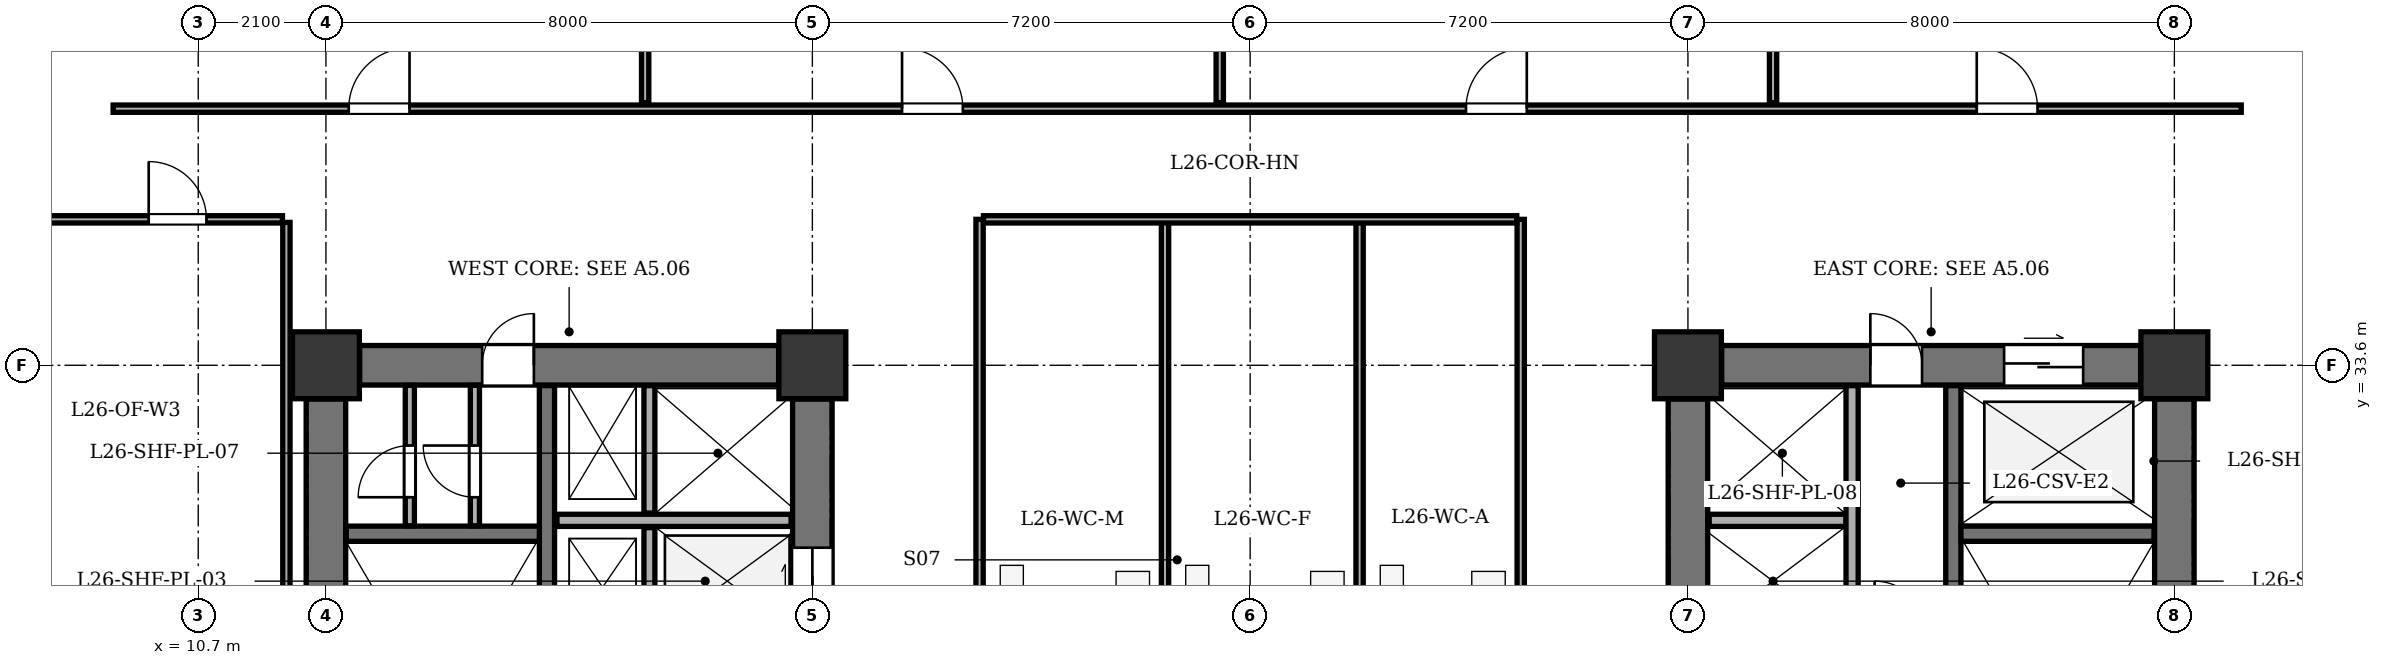
"""IFC4 building model, lengths in metres.
Left out: names, types, materials, properties, quantities, classifications, styles, units other than length and angle.
Written with IfcOpenShell. Run it as: python <this file> out.ifc"""

import sys

from ifc_helpers import new_model, si_unit, direction, frame, frame_2d, origin, origin_2d, place, context, subcontext, project, spatial, rectangle, extrude, element, fill, save


model = new_model("IFC4")
c1 = context("Model", 3, precision=1e-05, world=origin(), true_north=direction((0.0, 1.0)))
c2 = subcontext(c1, "Body", "Model", "MODEL_VIEW")
j1 = project(units=[si_unit("LENGTHUNIT", "METRE"), si_unit("PLANEANGLEUNIT", "RADIAN")], contexts=[c1])
p1 = place(None, origin())
s1 = spatial("IfcSite", under=j1, at=p1, CompositionType="ELEMENT")
p2 = place(p1, origin())
s2 = spatial("IfcBuilding", under=s1, at=p2, CompositionType="ELEMENT")
p3 = place(p2, frame((0.0, 0.0, 106.2)))
s3 = spatial("IfcBuildingStorey", under=s2, at=p3, CompositionType="ELEMENT", Elevation=106.2)
for number, where, z_axis, x_axis in (
    (1, (12.8, 33.6, 0.0), (0.0, 0.0, 1.0), (1.0, 0.0, 0.0)),
    (2, (20.8, 33.6, 0.0), (0.0, 0.0, 1.0), (1.0, 0.0, 0.0)),
    (3, (35.2, 33.6, 0.0), (0.0, 0.0, 1.0), (1.0, 0.0, 0.0)),
    (4, (43.2, 33.6, 0.0), (0.0, 0.0, 1.0), (1.0, 0.0, 0.0)),
):
    element("IfcColumn", number, at=place(p3, frame(where, z_axis=z_axis, x_axis=x_axis)), inside=s3, PredefinedType="COLUMN", context=c2, shape_type="SweptSolid", body=[
        extrude(rectangle(XDim=1.1, YDim=1.1, at=origin_2d()), origin(), (0.0, 0.0, 1.0), 3.9),
    ])
p4 = place(p3, frame((12.8, 21.355, 0.0), z_axis=(0.0, 0.0, 1.0), x_axis=(0.0, 1.0, 0.0)))
e5 = element("IfcWall", 5, at=p4, inside=s3, PredefinedType="SHEAR", context=c2, shape_type="SweptSolid", body=[
    extrude(rectangle(XDim=11.69, YDim=0.65, at=frame_2d((5.845, 0.0))), origin(), (0.0, 0.0, 1.0), 3.45),
])
p5 = place(p3, frame((13.355, 33.6, 0.0), z_axis=(0.0, 0.0, 1.0), x_axis=(1.0, 0.0, 0.0)))
e6 = element("IfcWall", 6, at=p5, inside=s3, PredefinedType="SHEAR", context=c2, shape_type="SweptSolid", body=[
    extrude(rectangle(XDim=6.89, YDim=0.65, at=frame_2d((3.445, 0.0))), origin(), (0.0, 0.0, 1.0), 3.45),
])
p6 = place(p5, frame((2.015, 0.0, 0.0)))
e7 = element("IfcOpeningElement", 7, at=p6, cuts=e6, PredefinedType="OPENING", context=c2, shape_type="SweptSolid", body=[
    extrude(rectangle(XDim=0.85, YDim=2.02, at=frame_2d((0.425, 1.01))), frame((0.0, 0.335, 0.0), z_axis=(0.0, -1.0, 0.0), x_axis=(1.0, 0.0, 0.0)), (0.0, 0.0, 1.0), 0.67),
])
p7 = place(p3, frame((20.8, 21.355, 0.0), z_axis=(0.0, 0.0, 1.0), x_axis=(0.0, 1.0, 0.0)))
e8 = element("IfcWall", 8, at=p7, inside=s3, PredefinedType="SHEAR", context=c2, shape_type="SweptSolid", body=[
    extrude(rectangle(XDim=11.69, YDim=0.65, at=frame_2d((5.845, 0.0))), origin(), (0.0, 0.0, 1.0), 3.45),
])
p8 = place(p7, frame((1.245, 0.0, 0.0)))
e9 = element("IfcOpeningElement", 9, at=p8, cuts=e8, PredefinedType="OPENING", context=c2, shape_type="SweptSolid", body=[
    extrude(rectangle(XDim=1.2, YDim=2.15, at=frame_2d((0.6, 1.075))), frame((0.0, 0.335, 0.0), z_axis=(0.0, -1.0, 0.0), x_axis=(1.0, 0.0, 0.0)), (0.0, 0.0, 1.0), 0.67),
])
p9 = place(p7, frame((4.245, 0.0, 0.0)))
e10 = element("IfcOpeningElement", 10, at=p9, cuts=e8, PredefinedType="OPENING", context=c2, shape_type="SweptSolid", body=[
    extrude(rectangle(XDim=1.1, YDim=2.1, at=frame_2d((0.55, 1.05))), frame((0.0, 0.335, 0.0), z_axis=(0.0, -1.0, 0.0), x_axis=(1.0, 0.0, 0.0)), (0.0, 0.0, 1.0), 0.67),
])
p10 = place(p7, frame((6.195, 0.0, 0.0)))
e11 = element("IfcOpeningElement", 11, at=p10, cuts=e8, PredefinedType="OPENING", context=c2, shape_type="SweptSolid", body=[
    extrude(rectangle(XDim=1.1, YDim=2.1, at=frame_2d((0.55, 1.05))), frame((0.0, 0.335, 0.0), z_axis=(0.0, -1.0, 0.0), x_axis=(1.0, 0.0, 0.0)), (0.0, 0.0, 1.0), 0.67),
])
p11 = place(p7, frame((8.145, 0.0, 0.0)))
e12 = element("IfcOpeningElement", 12, at=p11, cuts=e8, PredefinedType="OPENING", context=c2, shape_type="SweptSolid", body=[
    extrude(rectangle(XDim=1.1, YDim=2.1, at=frame_2d((0.55, 1.05))), frame((0.0, 0.335, 0.0), z_axis=(0.0, -1.0, 0.0), x_axis=(1.0, 0.0, 0.0)), (0.0, 0.0, 1.0), 0.67),
])
p12 = place(p3, frame((16.435, 21.135, 0.0), z_axis=(0.0, 0.0, 1.0), x_axis=(0.0, 1.0, 0.0)))
e13 = element("IfcWall", 13, at=p12, inside=s3, PredefinedType="SHEAR", context=c2, shape_type="SweptSolid", body=[
    extrude(rectangle(XDim=12.13, YDim=0.25, at=frame_2d((6.065, 0.0))), origin(), (0.0, 0.0, 1.0), 3.45),
])
p13 = place(p12, frame((0.515, 0.0, 0.0)))
e14 = element("IfcOpeningElement", 14, at=p13, cuts=e13, PredefinedType="OPENING", context=c2, shape_type="SweptSolid", body=[
    extrude(rectangle(XDim=1.2, YDim=2.15, at=frame_2d((0.6, 1.075))), frame((0.0, 0.135, 0.0), z_axis=(0.0, -1.0, 0.0), x_axis=(1.0, 0.0, 0.0)), (0.0, 0.0, 1.0), 0.27),
])
p14 = place(p12, frame((2.665, 0.0, 0.0)))
e15 = element("IfcOpeningElement", 15, at=p14, cuts=e13, PredefinedType="OPENING", context=c2, shape_type="SweptSolid", body=[
    extrude(rectangle(XDim=1.15, YDim=2.15, at=frame_2d((0.575, 1.075))), frame((0.0, 0.135, 0.0), z_axis=(0.0, -1.0, 0.0), x_axis=(1.0, 0.0, 0.0)), (0.0, 0.0, 1.0), 0.27),
])
p15 = place(p3, frame((13.135, 30.83, 0.0), z_axis=(0.0, 0.0, 1.0), x_axis=(1.0, 0.0, 0.0)))
e16 = element("IfcWall", 16, at=p15, inside=s3, PredefinedType="SHEAR", context=c2, shape_type="SweptSolid", body=[
    extrude(rectangle(XDim=3.175, YDim=0.25, at=frame_2d((1.587, 0.0))), origin(), (0.0, 0.0, 1.0), 3.45),
])
p16 = place(p3, frame((16.6, 31.05, 0.0), z_axis=(0.0, 0.0, 1.0), x_axis=(1.0, 0.0, 0.0)))
e17 = element("IfcWall", 17, at=p16, inside=s3, PredefinedType="SOLIDWALL", context=c2, shape_type="SweptSolid", body=[
    extrude(rectangle(XDim=3.85, YDim=0.2, at=frame_2d((1.925, 0.0))), origin(), (0.0, 0.0, 1.0), 3.45),
])
p17 = place(p3, frame((18.12, 25.27, 0.0), z_axis=(0.0, 0.0, 1.0), x_axis=(0.0, 1.0, 0.0)))
e18 = element("IfcWall", 18, at=p17, inside=s3, PredefinedType="PARTITIONING", context=c2, shape_type="SweptSolid", body=[
    extrude(rectangle(XDim=5.66, YDim=0.18, at=frame_2d((2.83, 0.0))), origin(), (0.0, 0.0, 1.0), 3.45),
])
p18 = place(p3, frame((18.12, 31.17, 0.0), z_axis=(0.0, 0.0, 1.0), x_axis=(0.0, 1.0, 0.0)))
e19 = element("IfcWall", 19, at=p18, inside=s3, PredefinedType="PARTITIONING", context=c2, shape_type="SweptSolid", body=[
    extrude(rectangle(XDim=2.095, YDim=0.18, at=frame_2d((1.047, 0.0))), origin(), (0.0, 0.0, 1.0), 3.45),
])
p19 = place(p3, frame((43.2, 21.355, 0.0), z_axis=(0.0, 0.0, 1.0), x_axis=(0.0, 1.0, 0.0)))
e20 = element("IfcWall", 20, at=p19, inside=s3, PredefinedType="SHEAR", context=c2, shape_type="SweptSolid", body=[
    extrude(rectangle(XDim=11.69, YDim=0.65, at=frame_2d((5.845, 0.0))), origin(), (0.0, 0.0, 1.0), 3.45),
])
p20 = place(p3, frame((35.755, 33.6, 0.0), z_axis=(0.0, 0.0, 1.0), x_axis=(1.0, 0.0, 0.0)))
e21 = element("IfcWall", 21, at=p20, inside=s3, PredefinedType="SHEAR", context=c2, shape_type="SweptSolid", body=[
    extrude(rectangle(XDim=6.89, YDim=0.65, at=frame_2d((3.445, 0.0))), origin(), (0.0, 0.0, 1.0), 3.45),
])
p21 = place(p20, frame((4.645, 0.0, 0.0)))
e22 = element("IfcOpeningElement", 22, at=p21, cuts=e21, PredefinedType="OPENING", context=c2, shape_type="SweptSolid", body=[
    extrude(rectangle(XDim=1.3, YDim=2.15, at=frame_2d((0.65, 1.075))), frame((0.0, 0.335, 0.0), z_axis=(0.0, -1.0, 0.0), x_axis=(1.0, 0.0, 0.0)), (0.0, 0.0, 1.0), 0.67),
])
p22 = place(p20, frame((2.445, 0.0, 0.0)))
e23 = element("IfcOpeningElement", 23, at=p22, cuts=e21, PredefinedType="OPENING", context=c2, shape_type="SweptSolid", body=[
    extrude(rectangle(XDim=0.85, YDim=2.02, at=frame_2d((0.425, 1.01))), frame((0.0, 0.335, 0.0), z_axis=(0.0, -1.0, 0.0), x_axis=(1.0, 0.0, 0.0)), (0.0, 0.0, 1.0), 0.67),
])
p23 = place(p3, frame((35.2, 21.355, 0.0), z_axis=(0.0, 0.0, 1.0), x_axis=(0.0, 1.0, 0.0)))
e24 = element("IfcWall", 24, at=p23, inside=s3, PredefinedType="SHEAR", context=c2, shape_type="SweptSolid", body=[
    extrude(rectangle(XDim=11.69, YDim=0.65, at=frame_2d((5.845, 0.0))), origin(), (0.0, 0.0, 1.0), 3.45),
])
p24 = place(p23, frame((1.245, 0.0, 0.0)))
e25 = element("IfcOpeningElement", 25, at=p24, cuts=e24, PredefinedType="OPENING", context=c2, shape_type="SweptSolid", body=[
    extrude(rectangle(XDim=1.2, YDim=2.15, at=frame_2d((0.6, 1.075))), frame((0.0, 0.335, 0.0), z_axis=(0.0, -1.0, 0.0), x_axis=(1.0, 0.0, 0.0)), (0.0, 0.0, 1.0), 0.67),
])
p25 = place(p3, frame((39.565, 21.135, 0.0), z_axis=(0.0, 0.0, 1.0), x_axis=(0.0, 1.0, 0.0)))
e26 = element("IfcWall", 26, at=p25, inside=s3, PredefinedType="SHEAR", context=c2, shape_type="SweptSolid", body=[
    extrude(rectangle(XDim=12.13, YDim=0.25, at=frame_2d((6.065, 0.0))), origin(), (0.0, 0.0, 1.0), 3.45),
])
p26 = place(p25, frame((0.515, 0.0, 0.0)))
e27 = element("IfcOpeningElement", 27, at=p26, cuts=e26, PredefinedType="OPENING", context=c2, shape_type="SweptSolid", body=[
    extrude(rectangle(XDim=1.2, YDim=2.15, at=frame_2d((0.6, 1.075))), frame((0.0, 0.135, 0.0), z_axis=(0.0, -1.0, 0.0), x_axis=(1.0, 0.0, 0.0)), (0.0, 0.0, 1.0), 0.27),
])
p27 = place(p25, frame((2.665, 0.0, 0.0)))
e28 = element("IfcOpeningElement", 28, at=p27, cuts=e26, PredefinedType="OPENING", context=c2, shape_type="SweptSolid", body=[
    extrude(rectangle(XDim=1.15, YDim=2.15, at=frame_2d((0.575, 1.075))), frame((0.0, 0.135, 0.0), z_axis=(0.0, -1.0, 0.0), x_axis=(1.0, 0.0, 0.0)), (0.0, 0.0, 1.0), 0.27),
])
p28 = place(p3, frame((39.69, 30.83, 0.0), z_axis=(0.0, 0.0, 1.0), x_axis=(1.0, 0.0, 0.0)))
e29 = element("IfcWall", 29, at=p28, inside=s3, PredefinedType="SHEAR", context=c2, shape_type="SweptSolid", body=[
    extrude(rectangle(XDim=3.175, YDim=0.25, at=frame_2d((1.587, 0.0))), origin(), (0.0, 0.0, 1.0), 3.45),
])
p29 = place(p3, frame((35.55, 31.05, 0.0), z_axis=(0.0, 0.0, 1.0), x_axis=(1.0, 0.0, 0.0)))
e30 = element("IfcWall", 30, at=p29, inside=s3, PredefinedType="SOLIDWALL", context=c2, shape_type="SweptSolid", body=[
    extrude(rectangle(XDim=2.25, YDim=0.2, at=frame_2d((1.125, 0.0))), origin(), (0.0, 0.0, 1.0), 3.45),
])
p30 = place(p3, frame((37.9, 25.27, 0.0), z_axis=(0.0, 0.0, 1.0), x_axis=(0.0, 1.0, 0.0)))
e31 = element("IfcWall", 31, at=p30, inside=s3, PredefinedType="SOLIDWALL", context=c2, shape_type="SweptSolid", body=[
    extrude(rectangle(XDim=7.995, YDim=0.2, at=frame_2d((3.998, 0.0))), origin(), (0.0, 0.0, 1.0), 3.45),
])
p31 = place(p3, frame((14.18, 30.96, 0.0), z_axis=(0.0, 0.0, 1.0), x_axis=(0.0, 1.0, 0.0)))
e32 = element("IfcWall", 32, at=p31, inside=s3, PredefinedType="PARTITIONING", context=c2, shape_type="SweptSolid", body=[
    extrude(rectangle(XDim=2.31, YDim=0.15, at=frame_2d((1.155, 0.0))), origin(), (0.0, 0.0, 1.0), 3.45),
])
p32 = place(p31, frame((0.47, 0.0, 0.0)))
e33 = element("IfcOpeningElement", 33, at=p32, cuts=e32, PredefinedType="OPENING", context=c2, shape_type="SweptSolid", body=[
    extrude(rectangle(XDim=0.85, YDim=2.02, at=frame_2d((0.425, 1.01))), frame((0.0, 0.085, 0.0), z_axis=(0.0, -1.0, 0.0), x_axis=(1.0, 0.0, 0.0)), (0.0, 0.0, 1.0), 0.17),
])
p33 = place(p3, frame((15.25, 30.96, 0.0), z_axis=(0.0, 0.0, 1.0), x_axis=(0.0, 1.0, 0.0)))
e34 = element("IfcWall", 34, at=p33, inside=s3, PredefinedType="PARTITIONING", context=c2, shape_type="SweptSolid", body=[
    extrude(rectangle(XDim=2.31, YDim=0.15, at=frame_2d((1.155, 0.0))), origin(), (0.0, 0.0, 1.0), 3.45),
])
p34 = place(p33, frame((0.47, 0.0, 0.0)))
e35 = element("IfcOpeningElement", 35, at=p34, cuts=e34, PredefinedType="OPENING", context=c2, shape_type="SweptSolid", body=[
    extrude(rectangle(XDim=0.85, YDim=2.02, at=frame_2d((0.425, 1.01))), frame((0.0, 0.085, 0.0), z_axis=(0.0, -1.0, 0.0), x_axis=(1.0, 0.0, 0.0)), (0.0, 0.0, 1.0), 0.17),
])
for number, where, z_axis, x_axis in (
    (36, (23.55, 24.715, 0.0), (0.0, 0.0, 1.0), (0.0, 1.0, 0.0)),
    (37, (32.45, 24.715, 0.0), (0.0, 0.0, 1.0), (0.0, 1.0, 0.0)),
    (38, (26.6, 24.715, 0.0), (0.0, 0.0, 1.0), (0.0, 1.0, 0.0)),
):
    element("IfcWall", number, at=place(p3, frame(where, z_axis=z_axis, x_axis=x_axis)), inside=s3, PredefinedType="PARTITIONING", context=c2, shape_type="SweptSolid", body=[
        extrude(rectangle(XDim=11.285, YDim=0.12, at=frame_2d((5.643, 0.0))), origin(), (0.0, 0.0, 1.0), 3.45),
    ])
p35 = place(p3, frame((29.8, 24.715, 0.0), z_axis=(0.0, 0.0, 1.0), x_axis=(0.0, 1.0, 0.0)))
e39 = element("IfcWall", 39, at=p35, inside=s3, PredefinedType="PARTITIONING", context=c2, shape_type="SweptSolid", body=[
    extrude(rectangle(XDim=11.285, YDim=0.12, at=frame_2d((5.643, 0.0))), origin(), (0.0, 0.0, 1.0), 2.985),
])
p36 = place(p3, frame((23.615, 36.0, 0.0), z_axis=(0.0, 0.0, 1.0), x_axis=(1.0, 0.0, 0.0)))
e40 = element("IfcWall", 40, at=p36, inside=s3, PredefinedType="PARTITIONING", context=c2, shape_type="SweptSolid", body=[
    extrude(rectangle(XDim=8.77, YDim=0.12, at=frame_2d((4.385, 0.0))), origin(), (0.0, 0.0, 1.0), 3.45),
])
p37 = place(p3, frame((9.3, 37.82, 0.0), z_axis=(0.0, 0.0, 1.0), x_axis=(1.0, 0.0, 0.0)))
e41 = element("IfcWall", 41, at=p37, inside=s3, PredefinedType="PARTITIONING", context=c2, shape_type="SweptSolid", body=[
    extrude(rectangle(XDim=35.0, YDim=0.12, at=frame_2d((17.5, 0.0))), origin(), (0.0, 0.0, 1.0), 3.45),
])
p38 = place(p37, frame((3.875, 0.0, 0.0)))
e42 = element("IfcOpeningElement", 42, at=p38, cuts=e41, PredefinedType="OPENING", context=c2, shape_type="SweptSolid", body=[
    extrude(rectangle(XDim=1.0, YDim=2.1, at=frame_2d((0.5, 1.05))), frame((0.0, 0.07, 0.0), z_axis=(0.0, -1.0, 0.0), x_axis=(1.0, 0.0, 0.0)), (0.0, 0.0, 1.0), 0.14),
])
p39 = place(p37, frame((12.975, 0.0, 0.0)))
e43 = element("IfcOpeningElement", 43, at=p39, cuts=e41, PredefinedType="OPENING", context=c2, shape_type="SweptSolid", body=[
    extrude(rectangle(XDim=1.0, YDim=2.1, at=frame_2d((0.5, 1.05))), frame((0.0, 0.07, 0.0), z_axis=(0.0, -1.0, 0.0), x_axis=(1.0, 0.0, 0.0)), (0.0, 0.0, 1.0), 0.14),
])
p40 = place(p37, frame((22.25, 0.0, 0.0)))
e44 = element("IfcOpeningElement", 44, at=p40, cuts=e41, PredefinedType="OPENING", context=c2, shape_type="SweptSolid", body=[
    extrude(rectangle(XDim=1.0, YDim=2.1, at=frame_2d((0.5, 1.05))), frame((0.0, 0.07, 0.0), z_axis=(0.0, -1.0, 0.0), x_axis=(1.0, 0.0, 0.0)), (0.0, 0.0, 1.0), 0.14),
])
p41 = place(p37, frame((30.65, 0.0, 0.0)))
e45 = element("IfcOpeningElement", 45, at=p41, cuts=e41, PredefinedType="OPENING", context=c2, shape_type="SweptSolid", body=[
    extrude(rectangle(XDim=1.0, YDim=2.1, at=frame_2d((0.5, 1.05))), frame((0.0, 0.07, 0.0), z_axis=(0.0, -1.0, 0.0), x_axis=(1.0, 0.0, 0.0)), (0.0, 0.0, 1.0), 0.14),
])
for number, where, z_axis, x_axis in (
    (46, (18.05, 37.92, 0.0), (0.0, 0.0, 1.0), (0.0, 1.0, 0.0)),
    (47, (27.5, 37.92, 0.0), (0.0, 0.0, 1.0), (0.0, 1.0, 0.0)),
    (48, (36.6, 37.92, 0.0), (0.0, 0.0, 1.0), (0.0, 1.0, 0.0)),
):
    element("IfcWall", number, at=place(p3, frame(where, z_axis=z_axis, x_axis=x_axis)), inside=s3, PredefinedType="PARTITIONING", context=c2, shape_type="SweptSolid", body=[
        extrude(rectangle(XDim=14.575, YDim=0.12, at=frame_2d((7.288, 0.0))), origin(), (0.0, 0.0, 1.0), 3.45),
    ])
p42 = place(p3, frame((12.15, 18.45, 0.0), z_axis=(0.0, 0.0, 1.0), x_axis=(0.0, 1.0, 0.0)))
e49 = element("IfcWall", 49, at=p42, inside=s3, PredefinedType="PARTITIONING", context=c2, shape_type="SweptSolid", body=[
    extrude(rectangle(XDim=17.5, YDim=0.12, at=frame_2d((8.75, 0.0))), origin(), (0.0, 0.0, 1.0), 3.45),
])
p43 = place(p3, frame((4.705, 36.0, 0.0), z_axis=(0.0, 0.0, 1.0), x_axis=(1.0, 0.0, 0.0)))
e50 = element("IfcWall", 50, at=p43, inside=s3, PredefinedType="PARTITIONING", context=c2, shape_type="SweptSolid", body=[
    extrude(rectangle(XDim=7.38, YDim=0.12, at=frame_2d((3.69, 0.0))), origin(), (0.0, 0.0, 1.0), 3.45),
])
p44 = place(p43, frame((5.18, 0.0, 0.0)))
e51 = element("IfcOpeningElement", 51, at=p44, cuts=e50, PredefinedType="OPENING", context=c2, shape_type="SweptSolid", body=[
    extrude(rectangle(XDim=0.95, YDim=2.1, at=frame_2d((0.475, 1.05))), frame((0.0, 0.07, 0.0), z_axis=(0.0, -1.0, 0.0), x_axis=(1.0, 0.0, 0.0)), (0.0, 0.0, 1.0), 0.14),
])
p45 = place(p6, origin())
e52 = element("IfcDoor", 52, at=p45, inside=s3, OperationType="SINGLE_SWING_RIGHT", PredefinedType="DOOR", context=c2, shape_type="SweptSolid", body=[
    extrude(rectangle(XDim=0.85, YDim=2.02, at=frame_2d((0.425, 1.01))), frame((0.0, 0.025, 0.0), z_axis=(0.0, -1.0, 0.0), x_axis=(1.0, 0.0, 0.0)), (0.0, 0.0, 1.0), 0.05),
])
fill(e7, e52)
p46 = place(p11, origin())
e53 = element("IfcDoor", 53, at=p46, inside=s3, OperationType="DOUBLE_DOOR_SLIDING", PredefinedType="DOOR", context=c2, shape_type="SweptSolid", body=[
    extrude(rectangle(XDim=1.1, YDim=2.1, at=frame_2d((0.55, 1.05))), frame((0.0, 0.025, 0.0), z_axis=(0.0, -1.0, 0.0), x_axis=(1.0, 0.0, 0.0)), (0.0, 0.0, 1.0), 0.05),
])
fill(e12, e53)
p47 = place(p21, origin())
e54 = element("IfcDoor", 54, at=p47, inside=s3, OperationType="DOUBLE_DOOR_SLIDING", PredefinedType="DOOR", context=c2, shape_type="SweptSolid", body=[
    extrude(rectangle(XDim=1.3, YDim=2.15, at=frame_2d((0.65, 1.075))), frame((0.0, 0.025, 0.0), z_axis=(0.0, -1.0, 0.0), x_axis=(1.0, 0.0, 0.0)), (0.0, 0.0, 1.0), 0.05),
])
fill(e22, e54)
p48 = place(p22, origin())
e55 = element("IfcDoor", 55, at=p48, inside=s3, OperationType="SINGLE_SWING_LEFT", PredefinedType="DOOR", context=c2, shape_type="SweptSolid", body=[
    extrude(rectangle(XDim=0.85, YDim=2.02, at=frame_2d((0.425, 1.01))), frame((0.0, 0.025, 0.0), z_axis=(0.0, -1.0, 0.0), x_axis=(1.0, 0.0, 0.0)), (0.0, 0.0, 1.0), 0.05),
])
fill(e23, e55)
p49 = place(p32, origin())
e56 = element("IfcDoor", 56, at=p49, inside=s3, OperationType="SINGLE_SWING_LEFT", PredefinedType="DOOR", context=c2, shape_type="SweptSolid", body=[
    extrude(rectangle(XDim=0.85, YDim=2.02, at=frame_2d((0.425, 1.01))), frame((0.0, 0.025, 0.0), z_axis=(0.0, -1.0, 0.0), x_axis=(1.0, 0.0, 0.0)), (0.0, 0.0, 1.0), 0.05),
])
fill(e33, e56)
p50 = place(p34, origin())
e57 = element("IfcDoor", 57, at=p50, inside=s3, OperationType="SINGLE_SWING_RIGHT", PredefinedType="DOOR", context=c2, shape_type="SweptSolid", body=[
    extrude(rectangle(XDim=0.85, YDim=2.02, at=frame_2d((0.425, 1.01))), frame((0.0, 0.025, 0.0), z_axis=(0.0, -1.0, 0.0), x_axis=(1.0, 0.0, 0.0)), (0.0, 0.0, 1.0), 0.05),
])
fill(e35, e57)
p51 = place(p38, origin())
e58 = element("IfcDoor", 58, at=p51, inside=s3, OperationType="SINGLE_SWING_RIGHT", PredefinedType="DOOR", context=c2, shape_type="SweptSolid", body=[
    extrude(rectangle(XDim=1.0, YDim=2.1, at=frame_2d((0.5, 1.05))), frame((0.0, 0.025, 0.0), z_axis=(0.0, -1.0, 0.0), x_axis=(1.0, 0.0, 0.0)), (0.0, 0.0, 1.0), 0.05),
])
fill(e42, e58)
p52 = place(p39, origin())
e59 = element("IfcDoor", 59, at=p52, inside=s3, OperationType="SINGLE_SWING_LEFT", PredefinedType="DOOR", context=c2, shape_type="SweptSolid", body=[
    extrude(rectangle(XDim=1.0, YDim=2.1, at=frame_2d((0.5, 1.05))), frame((0.0, 0.025, 0.0), z_axis=(0.0, -1.0, 0.0), x_axis=(1.0, 0.0, 0.0)), (0.0, 0.0, 1.0), 0.05),
])
fill(e43, e59)
p53 = place(p40, origin())
e60 = element("IfcDoor", 60, at=p53, inside=s3, OperationType="SINGLE_SWING_RIGHT", PredefinedType="DOOR", context=c2, shape_type="SweptSolid", body=[
    extrude(rectangle(XDim=1.0, YDim=2.1, at=frame_2d((0.5, 1.05))), frame((0.0, 0.025, 0.0), z_axis=(0.0, -1.0, 0.0), x_axis=(1.0, 0.0, 0.0)), (0.0, 0.0, 1.0), 0.05),
])
fill(e44, e60)
p54 = place(p41, origin())
e61 = element("IfcDoor", 61, at=p54, inside=s3, OperationType="SINGLE_SWING_LEFT", PredefinedType="DOOR", context=c2, shape_type="SweptSolid", body=[
    extrude(rectangle(XDim=1.0, YDim=2.1, at=frame_2d((0.5, 1.05))), frame((0.0, 0.025, 0.0), z_axis=(0.0, -1.0, 0.0), x_axis=(1.0, 0.0, 0.0)), (0.0, 0.0, 1.0), 0.05),
])
fill(e45, e61)
p55 = place(p44, origin())
e62 = element("IfcDoor", 62, at=p55, inside=s3, OperationType="SINGLE_SWING_LEFT", PredefinedType="DOOR", context=c2, shape_type="SweptSolid", body=[
    extrude(rectangle(XDim=0.95, YDim=2.1, at=frame_2d((0.475, 1.05))), frame((0.0, 0.025, 0.0), z_axis=(0.0, -1.0, 0.0), x_axis=(1.0, 0.0, 0.0)), (0.0, 0.0, 1.0), 0.05),
])
fill(e51, e62)
save(model, sys.argv[1])
